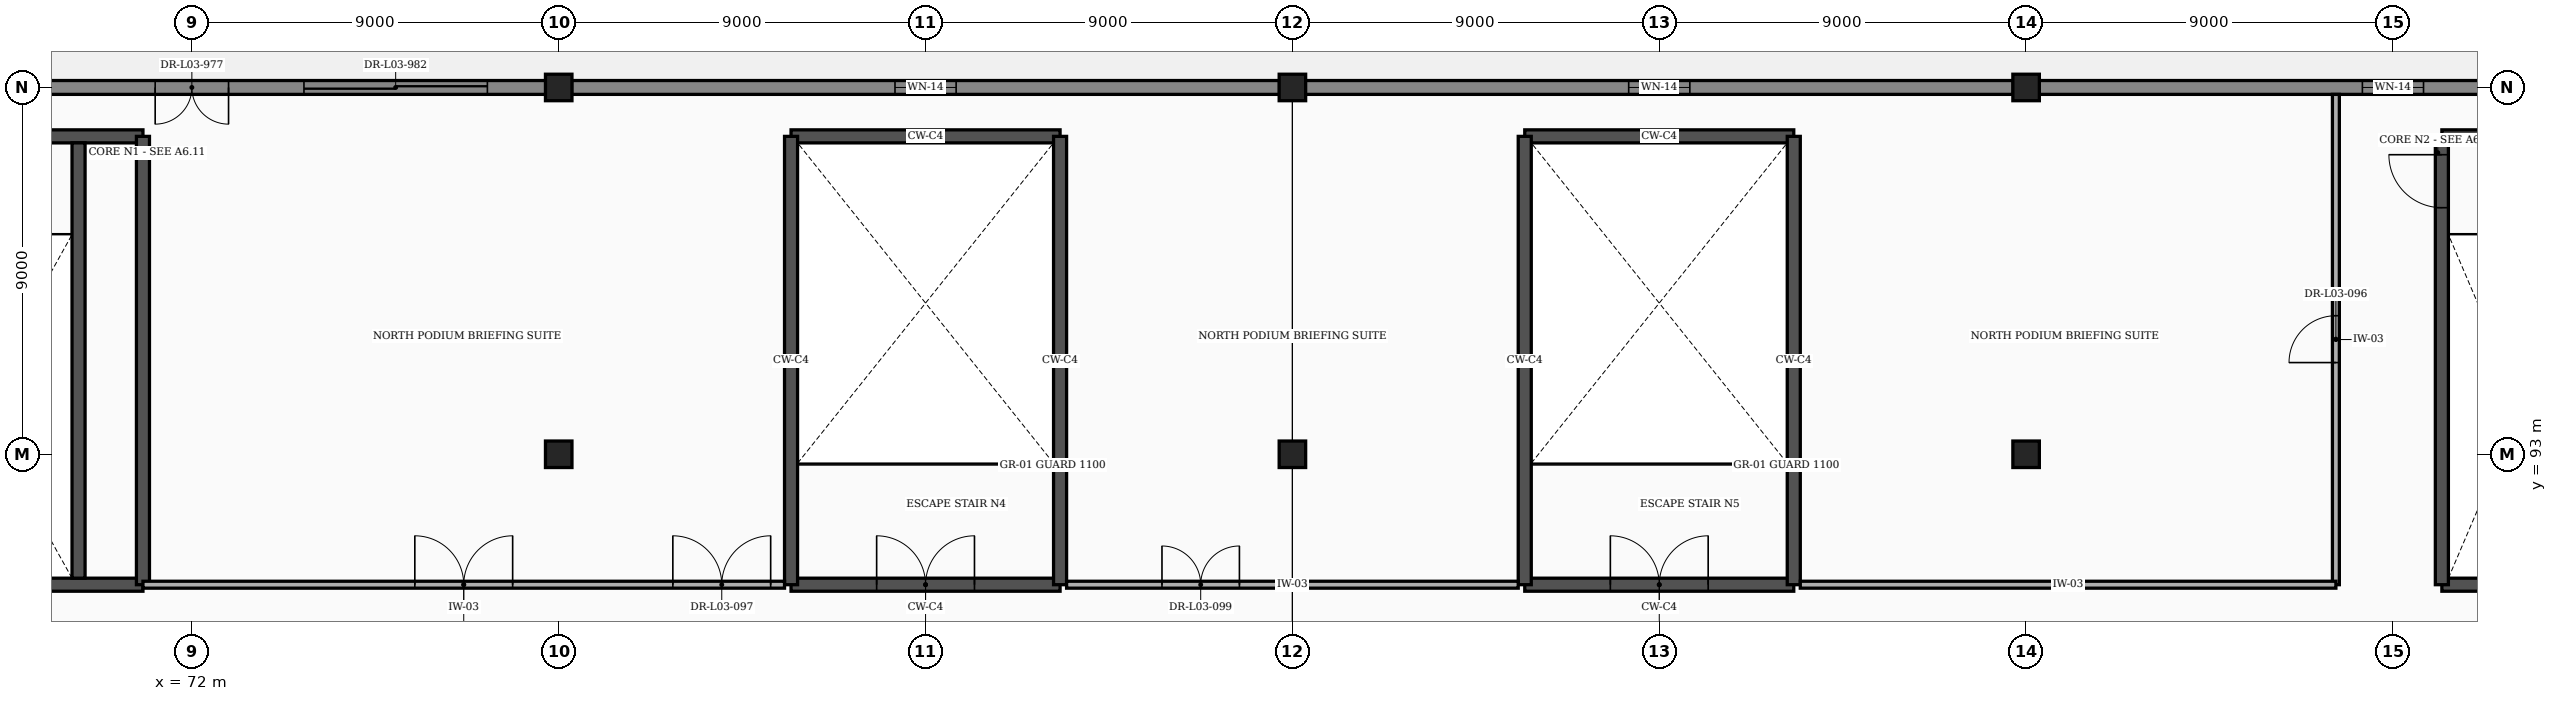
"""IFC4 building model, lengths in metres.
Left out: names, types, materials, properties, quantities, classifications, styles, units other than length and angle.
Written with IfcOpenShell. Run it as: python <this file> out.ifc"""

import sys

from ifc_helpers import new_model, si_unit, direction, frame, frame_2d, origin, origin_2d, place, context, subcontext, project, spatial, rectangle, extrude, element, fill, save


model = new_model("IFC4")
c1 = context("Model", 3, precision=1e-05, world=origin(), true_north=direction((0.0, 1.0)))
c2 = subcontext(c1, "Body", "Model", "MODEL_VIEW")
j1 = project(units=[si_unit("LENGTHUNIT", "METRE"), si_unit("PLANEANGLEUNIT", "RADIAN")], contexts=[c1])
p1 = place(None, origin())
s1 = spatial("IfcSite", under=j1, at=p1, CompositionType="ELEMENT")
p2 = place(p1, origin())
s2 = spatial("IfcBuilding", under=s1, at=p2, CompositionType="ELEMENT")
p3 = place(p2, frame((0.0, 0.0, 16.8)))
s3 = spatial("IfcBuildingStorey", under=s2, at=p3, CompositionType="ELEMENT", Elevation=16.8)
for number, where, z_axis, x_axis in (
    (1, (81.0, 93.0, 0.0), (0.0, 0.0, 1.0), (1.0, 0.0, 0.0)),
    (2, (81.0, 102.0, 0.0), (0.0, 0.0, 1.0), (1.0, 0.0, 0.0)),
    (3, (99.0, 93.0, 0.0), (0.0, 0.0, 1.0), (1.0, 0.0, 0.0)),
    (4, (99.0, 102.0, 0.0), (0.0, 0.0, 1.0), (1.0, 0.0, 0.0)),
    (5, (117.0, 93.0, 0.0), (0.0, 0.0, 1.0), (1.0, 0.0, 0.0)),
    (6, (117.0, 102.0, 0.0), (0.0, 0.0, 1.0), (1.0, 0.0, 0.0)),
):
    element("IfcColumn", number, at=place(p3, frame(where, z_axis=z_axis, x_axis=x_axis)), inside=s3, PredefinedType="COLUMN", context=c2, shape_type="SweptSolid", body=[
        extrude(rectangle(XDim=0.65, YDim=0.65, at=origin_2d()), origin(), (0.0, 0.0, 1.0), 4.8),
    ])
p4 = place(p3, frame((63.317, 102.0, 0.0), z_axis=(0.0, 0.0, 1.0), x_axis=(1.0, 0.0, 0.0)))
e7 = element("IfcWall", 7, at=p4, inside=s3, PredefinedType="STANDARD", context=c2, shape_type="SweptSolid", body=[
    extrude(rectangle(XDim=17.366, YDim=0.34, at=frame_2d((8.683, 0.0))), origin(), (0.0, 0.0, 1.0), 4.195),
])
p5 = place(p4, frame((7.783, 0.0, 0.0)))
e8 = element("IfcOpeningElement", 8, at=p5, cuts=e7, PredefinedType="OPENING", context=c2, shape_type="SweptSolid", body=[
    extrude(rectangle(XDim=1.8, YDim=2.3, at=frame_2d((0.9, 1.15))), frame((0.0, 0.182, 0.0), z_axis=(0.0, -1.0, 0.0), x_axis=(1.0, 0.0, 0.0)), (0.0, 0.0, 1.0), 0.364),
])
p6 = place(p4, frame((11.433, 0.0, 0.0)))
e9 = element("IfcOpeningElement", 9, at=p6, cuts=e7, PredefinedType="OPENING", context=c2, shape_type="SweptSolid", body=[
    extrude(rectangle(XDim=4.5, YDim=2.5, at=frame_2d((2.25, 1.25))), frame((0.0, 0.182, 0.0), z_axis=(0.0, -1.0, 0.0), x_axis=(1.0, 0.0, 0.0)), (0.0, 0.0, 1.0), 0.364),
])
p7 = place(p3, frame((81.317, 102.0, 0.0), z_axis=(0.0, 0.0, 1.0), x_axis=(1.0, 0.0, 0.0)))
e10 = element("IfcWall", 10, at=p7, inside=s3, PredefinedType="STANDARD", context=c2, shape_type="SweptSolid", body=[
    extrude(rectangle(XDim=17.366, YDim=0.34, at=frame_2d((8.683, 0.0))), origin(), (0.0, 0.0, 1.0), 4.195),
])
p8 = place(p7, frame((7.933, 0.0, 0.85)))
e11 = element("IfcOpeningElement", 11, at=p8, cuts=e10, PredefinedType="OPENING", context=c2, shape_type="SweptSolid", body=[
    extrude(rectangle(XDim=1.5, YDim=1.8, at=frame_2d((0.75, 0.9))), frame((0.0, 0.182, 0.0), z_axis=(0.0, -1.0, 0.0), x_axis=(1.0, 0.0, 0.0)), (0.0, 0.0, 1.0), 0.364),
])
p9 = place(p3, frame((99.317, 102.0, 0.0), z_axis=(0.0, 0.0, 1.0), x_axis=(1.0, 0.0, 0.0)))
e12 = element("IfcWall", 12, at=p9, inside=s3, PredefinedType="STANDARD", context=c2, shape_type="SweptSolid", body=[
    extrude(rectangle(XDim=17.366, YDim=0.34, at=frame_2d((8.683, 0.0))), origin(), (0.0, 0.0, 1.0), 4.195),
])
p10 = place(p9, frame((7.933, 0.0, 0.85)))
e13 = element("IfcOpeningElement", 13, at=p10, cuts=e12, PredefinedType="OPENING", context=c2, shape_type="SweptSolid", body=[
    extrude(rectangle(XDim=1.5, YDim=1.8, at=frame_2d((0.75, 0.9))), frame((0.0, 0.182, 0.0), z_axis=(0.0, -1.0, 0.0), x_axis=(1.0, 0.0, 0.0)), (0.0, 0.0, 1.0), 0.364),
])
p11 = place(p3, frame((117.317, 102.0, 0.0), z_axis=(0.0, 0.0, 1.0), x_axis=(1.0, 0.0, 0.0)))
e14 = element("IfcWall", 14, at=p11, inside=s3, PredefinedType="STANDARD", context=c2, shape_type="SweptSolid", body=[
    extrude(rectangle(XDim=17.366, YDim=0.34, at=frame_2d((8.683, 0.0))), origin(), (0.0, 0.0, 1.0), 4.195),
])
p12 = place(p11, frame((7.933, 0.0, 0.85)))
e15 = element("IfcOpeningElement", 15, at=p12, cuts=e14, PredefinedType="OPENING", context=c2, shape_type="SweptSolid", body=[
    extrude(rectangle(XDim=1.5, YDim=1.8, at=frame_2d((0.75, 0.9))), frame((0.0, 0.182, 0.0), z_axis=(0.0, -1.0, 0.0), x_axis=(1.0, 0.0, 0.0)), (0.0, 0.0, 1.0), 0.364),
])
for number, where, z_axis, x_axis in (
    (16, (64.2, 89.8, 0.0), (0.0, 0.0, 1.0), (1.0, 0.0, 0.0)),
    (17, (64.2, 100.8, 0.0), (0.0, 0.0, 1.0), (1.0, 0.0, 0.0)),
):
    element("IfcWall", number, at=place(p3, frame(where, z_axis=z_axis, x_axis=x_axis)), inside=s3, PredefinedType="SHEAR", context=c2, shape_type="SweptSolid", body=[
        extrude(rectangle(XDim=6.6, YDim=0.32, at=frame_2d((3.3, 0.0))), origin(), (0.0, 0.0, 1.0), 4.555),
    ])
p13 = place(p3, frame((70.8, 89.8, 0.0), z_axis=(0.0, 0.0, 1.0), x_axis=(0.0, 1.0, 0.0)))
e18 = element("IfcWall", 18, at=p13, inside=s3, PredefinedType="SHEAR", context=c2, shape_type="SweptSolid", body=[
    extrude(rectangle(XDim=11.0, YDim=0.32, at=frame_2d((5.5, 0.0))), origin(), (0.0, 0.0, 1.0), 4.555),
])
p14 = place(p3, frame((69.22, 89.96, 0.0), z_axis=(0.0, 0.0, 1.0), x_axis=(0.0, 1.0, 0.0)))
e19 = element("IfcWall", 19, at=p14, inside=s3, PredefinedType="SHEAR", context=c2, shape_type="SweptSolid", body=[
    extrude(rectangle(XDim=10.68, YDim=0.32, at=frame_2d((5.34, 0.0))), origin(), (0.0, 0.0, 1.0), 4.555),
])
p15 = place(p3, frame((127.2, 89.8, 0.0), z_axis=(0.0, 0.0, 1.0), x_axis=(1.0, 0.0, 0.0)))
e20 = element("IfcWall", 20, at=p15, inside=s3, PredefinedType="SHEAR", context=c2, shape_type="SweptSolid", body=[
    extrude(rectangle(XDim=6.6, YDim=0.32, at=frame_2d((3.3, 0.0))), origin(), (0.0, 0.0, 1.0), 4.555),
])
p16 = place(p15, frame((4.45, 0.0, 0.0)))
e21 = element("IfcOpeningElement", 21, at=p16, cuts=e20, PredefinedType="OPENING", context=c2, shape_type="SweptSolid", body=[
    extrude(rectangle(XDim=1.6, YDim=2.3, at=frame_2d((0.8, 1.15))), frame((0.0, 0.172, 0.0), z_axis=(0.0, -1.0, 0.0), x_axis=(1.0, 0.0, 0.0)), (0.0, 0.0, 1.0), 0.344),
])
p17 = place(p3, frame((127.2, 100.8, 0.0), z_axis=(0.0, 0.0, 1.0), x_axis=(1.0, 0.0, 0.0)))
e22 = element("IfcWall", 22, at=p17, inside=s3, PredefinedType="SHEAR", context=c2, shape_type="SweptSolid", body=[
    extrude(rectangle(XDim=6.6, YDim=0.32, at=frame_2d((3.3, 0.0))), origin(), (0.0, 0.0, 1.0), 4.555),
])
p18 = place(p3, frame((127.2, 89.8, 0.0), z_axis=(0.0, 0.0, 1.0), x_axis=(0.0, 1.0, 0.0)))
e23 = element("IfcWall", 23, at=p18, inside=s3, PredefinedType="SHEAR", context=c2, shape_type="SweptSolid", body=[
    extrude(rectangle(XDim=11.0, YDim=0.32, at=frame_2d((5.5, 0.0))), origin(), (0.0, 0.0, 1.0), 4.555),
])
p19 = place(p18, frame((9.25, 0.0, 0.0)))
e24 = element("IfcOpeningElement", 24, at=p19, cuts=e23, PredefinedType="OPENING", context=c2, shape_type="SweptSolid", body=[
    extrude(rectangle(XDim=1.3, YDim=2.2, at=frame_2d((0.65, 1.1))), frame((0.0, 0.172, 0.0), z_axis=(0.0, -1.0, 0.0), x_axis=(1.0, 0.0, 0.0)), (0.0, 0.0, 1.0), 0.344),
])
p20 = place(p3, frame((86.7, 89.8, 0.0), z_axis=(0.0, 0.0, 1.0), x_axis=(1.0, 0.0, 0.0)))
e25 = element("IfcWall", 25, at=p20, inside=s3, PredefinedType="SHEAR", context=c2, shape_type="SweptSolid", body=[
    extrude(rectangle(XDim=6.6, YDim=0.32, at=frame_2d((3.3, 0.0))), origin(), (0.0, 0.0, 1.0), 4.555),
])
p21 = place(p20, frame((2.1, 0.0, 0.0)))
e26 = element("IfcOpeningElement", 26, at=p21, cuts=e25, PredefinedType="OPENING", context=c2, shape_type="SweptSolid", body=[
    extrude(rectangle(XDim=2.4, YDim=2.25, at=frame_2d((1.2, 1.125))), frame((0.0, 0.172, 0.0), z_axis=(0.0, -1.0, 0.0), x_axis=(1.0, 0.0, 0.0)), (0.0, 0.0, 1.0), 0.344),
])
p22 = place(p3, frame((86.7, 100.8, 0.0), z_axis=(0.0, 0.0, 1.0), x_axis=(1.0, 0.0, 0.0)))
e27 = element("IfcWall", 27, at=p22, inside=s3, PredefinedType="SHEAR", context=c2, shape_type="SweptSolid", body=[
    extrude(rectangle(XDim=6.6, YDim=0.32, at=frame_2d((3.3, 0.0))), origin(), (0.0, 0.0, 1.0), 4.555),
])
for number, where, z_axis, x_axis in (
    (28, (86.7, 89.8, 0.0), (0.0, 0.0, 1.0), (0.0, 1.0, 0.0)),
    (29, (93.3, 89.8, 0.0), (0.0, 0.0, 1.0), (0.0, 1.0, 0.0)),
):
    element("IfcWall", number, at=place(p3, frame(where, z_axis=z_axis, x_axis=x_axis)), inside=s3, PredefinedType="SHEAR", context=c2, shape_type="SweptSolid", body=[
        extrude(rectangle(XDim=11.0, YDim=0.32, at=frame_2d((5.5, 0.0))), origin(), (0.0, 0.0, 1.0), 4.555),
    ])
p23 = place(p3, frame((104.7, 89.8, 0.0), z_axis=(0.0, 0.0, 1.0), x_axis=(1.0, 0.0, 0.0)))
e30 = element("IfcWall", 30, at=p23, inside=s3, PredefinedType="SHEAR", context=c2, shape_type="SweptSolid", body=[
    extrude(rectangle(XDim=6.6, YDim=0.32, at=frame_2d((3.3, 0.0))), origin(), (0.0, 0.0, 1.0), 4.555),
])
p24 = place(p23, frame((2.1, 0.0, 0.0)))
e31 = element("IfcOpeningElement", 31, at=p24, cuts=e30, PredefinedType="OPENING", context=c2, shape_type="SweptSolid", body=[
    extrude(rectangle(XDim=2.4, YDim=2.25, at=frame_2d((1.2, 1.125))), frame((0.0, 0.172, 0.0), z_axis=(0.0, -1.0, 0.0), x_axis=(1.0, 0.0, 0.0)), (0.0, 0.0, 1.0), 0.344),
])
p25 = place(p3, frame((104.7, 100.8, 0.0), z_axis=(0.0, 0.0, 1.0), x_axis=(1.0, 0.0, 0.0)))
e32 = element("IfcWall", 32, at=p25, inside=s3, PredefinedType="SHEAR", context=c2, shape_type="SweptSolid", body=[
    extrude(rectangle(XDim=6.6, YDim=0.32, at=frame_2d((3.3, 0.0))), origin(), (0.0, 0.0, 1.0), 4.555),
])
for number, where, z_axis, x_axis in (
    (33, (104.7, 89.8, 0.0), (0.0, 0.0, 1.0), (0.0, 1.0, 0.0)),
    (34, (111.3, 89.8, 0.0), (0.0, 0.0, 1.0), (0.0, 1.0, 0.0)),
):
    element("IfcWall", number, at=place(p3, frame(where, z_axis=z_axis, x_axis=x_axis)), inside=s3, PredefinedType="SHEAR", context=c2, shape_type="SweptSolid", body=[
        extrude(rectangle(XDim=11.0, YDim=0.32, at=frame_2d((5.5, 0.0))), origin(), (0.0, 0.0, 1.0), 4.555),
    ])
p26 = place(p3, frame((124.6, 89.8, 0.0), z_axis=(0.0, 0.0, 1.0), x_axis=(0.0, 1.0, 0.0)))
e35 = element("IfcWall", 35, at=p26, inside=s3, PredefinedType="PARTITIONING", context=c2, shape_type="SweptSolid", body=[
    extrude(rectangle(XDim=12.03, YDim=0.17, at=frame_2d((6.015, 0.0))), origin(), (0.0, 0.0, 1.0), 4.555),
])
p27 = place(p26, frame((5.45, 0.0, 0.0)))
e36 = element("IfcOpeningElement", 36, at=p27, cuts=e35, PredefinedType="OPENING", context=c2, shape_type="SweptSolid", body=[
    extrude(rectangle(XDim=1.15, YDim=2.15, at=frame_2d((0.575, 1.075))), frame((0.0, 0.097, 0.0), z_axis=(0.0, -1.0, 0.0), x_axis=(1.0, 0.0, 0.0)), (0.0, 0.0, 1.0), 0.194),
])
p28 = place(p3, frame((70.8, 89.8, 0.0), z_axis=(0.0, 0.0, 1.0), x_axis=(1.0, 0.0, 0.0)))
e37 = element("IfcWall", 37, at=p28, inside=s3, PredefinedType="PARTITIONING", context=c2, shape_type="SweptSolid", body=[
    extrude(rectangle(XDim=15.74, YDim=0.17, at=frame_2d((7.87, 0.0))), origin(), (0.0, 0.0, 1.0), 4.555),
])
p29 = place(p28, frame((13.0, 0.0, 0.0)))
e38 = element("IfcOpeningElement", 38, at=p29, cuts=e37, PredefinedType="OPENING", context=c2, shape_type="SweptSolid", body=[
    extrude(rectangle(XDim=2.4, YDim=2.35, at=frame_2d((1.2, 1.175))), frame((0.0, 0.097, 0.0), z_axis=(0.0, -1.0, 0.0), x_axis=(1.0, 0.0, 0.0)), (0.0, 0.0, 1.0), 0.194),
])
p30 = place(p28, frame((6.67, 0.0, 0.0)))
e39 = element("IfcOpeningElement", 39, at=p30, cuts=e37, PredefinedType="OPENING", context=c2, shape_type="SweptSolid", body=[
    extrude(rectangle(XDim=2.4, YDim=2.35, at=frame_2d((1.2, 1.175))), frame((0.0, 0.097, 0.0), z_axis=(0.0, -1.0, 0.0), x_axis=(1.0, 0.0, 0.0)), (0.0, 0.0, 1.0), 0.194),
])
p31 = place(p3, frame((93.46, 89.8, 0.0), z_axis=(0.0, 0.0, 1.0), x_axis=(1.0, 0.0, 0.0)))
e40 = element("IfcWall", 40, at=p31, inside=s3, PredefinedType="PARTITIONING", context=c2, shape_type="SweptSolid", body=[
    extrude(rectangle(XDim=11.08, YDim=0.17, at=frame_2d((5.54, 0.0))), origin(), (0.0, 0.0, 1.0), 4.555),
])
p32 = place(p31, frame((2.34, 0.0, 0.0)))
e41 = element("IfcOpeningElement", 41, at=p32, cuts=e40, PredefinedType="OPENING", context=c2, shape_type="SweptSolid", body=[
    extrude(rectangle(XDim=1.9, YDim=2.35, at=frame_2d((0.95, 1.175))), frame((0.0, 0.097, 0.0), z_axis=(0.0, -1.0, 0.0), x_axis=(1.0, 0.0, 0.0)), (0.0, 0.0, 1.0), 0.194),
])
p33 = place(p3, frame((111.46, 89.8, 0.0), z_axis=(0.0, 0.0, 1.0), x_axis=(1.0, 0.0, 0.0)))
e42 = element("IfcWall", 42, at=p33, inside=s3, PredefinedType="PARTITIONING", context=c2, shape_type="SweptSolid", body=[
    extrude(rectangle(XDim=13.14, YDim=0.17, at=frame_2d((6.57, 0.0))), origin(), (0.0, 0.0, 1.0), 4.555),
])
p34 = place(p5, frame((1.8, 0.0, 0.0), z_axis=(0.0, 0.0, 1.0), x_axis=(-1.0, 0.0, 0.0)))
e43 = element("IfcDoor", 43, at=p34, inside=s3, OperationType="DOUBLE_DOOR_SINGLE_SWING", PredefinedType="DOOR", context=c2, shape_type="SweptSolid", body=[
    extrude(rectangle(XDim=1.8, YDim=2.3, at=frame_2d((0.9, 1.15))), frame((0.0, 0.025, 0.0), z_axis=(0.0, -1.0, 0.0), x_axis=(1.0, 0.0, 0.0)), (0.0, 0.0, 1.0), 0.05),
])
fill(e8, e43)
p35 = place(p8, origin())
e44 = element("IfcWindow", 44, at=p35, inside=s3, PartitioningType="SINGLE_PANEL", PredefinedType="WINDOW", context=c2, shape_type="SweptSolid", body=[
    extrude(rectangle(XDim=1.5, YDim=1.8, at=frame_2d((0.75, 0.9))), frame((0.0, 0.03, 0.0), z_axis=(0.0, -1.0, 0.0), x_axis=(1.0, 0.0, 0.0)), (0.0, 0.0, 1.0), 0.06),
])
fill(e11, e44)
p36 = place(p10, origin())
e45 = element("IfcWindow", 45, at=p36, inside=s3, PartitioningType="SINGLE_PANEL", PredefinedType="WINDOW", context=c2, shape_type="SweptSolid", body=[
    extrude(rectangle(XDim=1.5, YDim=1.8, at=frame_2d((0.75, 0.9))), frame((0.0, 0.03, 0.0), z_axis=(0.0, -1.0, 0.0), x_axis=(1.0, 0.0, 0.0)), (0.0, 0.0, 1.0), 0.06),
])
fill(e13, e45)
p37 = place(p12, origin())
e46 = element("IfcWindow", 46, at=p37, inside=s3, PartitioningType="SINGLE_PANEL", PredefinedType="WINDOW", context=c2, shape_type="SweptSolid", body=[
    extrude(rectangle(XDim=1.5, YDim=1.8, at=frame_2d((0.75, 0.9))), frame((0.0, 0.03, 0.0), z_axis=(0.0, -1.0, 0.0), x_axis=(1.0, 0.0, 0.0)), (0.0, 0.0, 1.0), 0.06),
])
fill(e15, e46)
p38 = place(p6, origin())
e47 = element("IfcDoor", 47, at=p38, inside=s3, OperationType="DOUBLE_DOOR_SLIDING", PredefinedType="DOOR", context=c2, shape_type="SweptSolid", body=[
    extrude(rectangle(XDim=4.5, YDim=2.5, at=frame_2d((2.25, 1.25))), frame((0.0, 0.025, 0.0), z_axis=(0.0, -1.0, 0.0), x_axis=(1.0, 0.0, 0.0)), (0.0, 0.0, 1.0), 0.05),
])
fill(e9, e47)
p39 = place(p19, origin())
e48 = element("IfcDoor", 48, at=p39, inside=s3, OperationType="SINGLE_SWING_RIGHT", PredefinedType="DOOR", context=c2, shape_type="SweptSolid", body=[
    extrude(rectangle(XDim=1.3, YDim=2.2, at=frame_2d((0.65, 1.1))), frame((0.0, 0.025, 0.0), z_axis=(0.0, -1.0, 0.0), x_axis=(1.0, 0.0, 0.0)), (0.0, 0.0, 1.0), 0.05),
])
fill(e24, e48)
p40 = place(p21, origin())
e49 = element("IfcDoor", 49, at=p40, inside=s3, OperationType="DOUBLE_DOOR_SINGLE_SWING", PredefinedType="DOOR", context=c2, shape_type="SweptSolid", body=[
    extrude(rectangle(XDim=2.4, YDim=2.25, at=frame_2d((1.2, 1.125))), frame((0.0, 0.025, 0.0), z_axis=(0.0, -1.0, 0.0), x_axis=(1.0, 0.0, 0.0)), (0.0, 0.0, 1.0), 0.05),
])
fill(e26, e49)
p41 = place(p24, origin())
e50 = element("IfcDoor", 50, at=p41, inside=s3, OperationType="DOUBLE_DOOR_SINGLE_SWING", PredefinedType="DOOR", context=c2, shape_type="SweptSolid", body=[
    extrude(rectangle(XDim=2.4, YDim=2.25, at=frame_2d((1.2, 1.125))), frame((0.0, 0.025, 0.0), z_axis=(0.0, -1.0, 0.0), x_axis=(1.0, 0.0, 0.0)), (0.0, 0.0, 1.0), 0.05),
])
fill(e31, e50)
p42 = place(p27, origin())
e51 = element("IfcDoor", 51, at=p42, inside=s3, OperationType="SINGLE_SWING_LEFT", PredefinedType="DOOR", context=c2, shape_type="SweptSolid", body=[
    extrude(rectangle(XDim=1.15, YDim=2.15, at=frame_2d((0.575, 1.075))), frame((0.0, 0.025, 0.0), z_axis=(0.0, -1.0, 0.0), x_axis=(1.0, 0.0, 0.0)), (0.0, 0.0, 1.0), 0.05),
])
fill(e36, e51)
p43 = place(p29, origin())
e52 = element("IfcDoor", 52, at=p43, inside=s3, OperationType="DOUBLE_DOOR_SINGLE_SWING", PredefinedType="DOOR", context=c2, shape_type="SweptSolid", body=[
    extrude(rectangle(XDim=2.4, YDim=2.35, at=frame_2d((1.2, 1.175))), frame((0.0, 0.025, 0.0), z_axis=(0.0, -1.0, 0.0), x_axis=(1.0, 0.0, 0.0)), (0.0, 0.0, 1.0), 0.05),
])
fill(e38, e52)
p44 = place(p30, origin())
e53 = element("IfcDoor", 53, at=p44, inside=s3, OperationType="DOUBLE_DOOR_SINGLE_SWING", PredefinedType="DOOR", context=c2, shape_type="SweptSolid", body=[
    extrude(rectangle(XDim=2.4, YDim=2.35, at=frame_2d((1.2, 1.175))), frame((0.0, 0.025, 0.0), z_axis=(0.0, -1.0, 0.0), x_axis=(1.0, 0.0, 0.0)), (0.0, 0.0, 1.0), 0.05),
])
fill(e39, e53)
p45 = place(p32, origin())
e54 = element("IfcDoor", 54, at=p45, inside=s3, OperationType="DOUBLE_DOOR_SINGLE_SWING", PredefinedType="DOOR", context=c2, shape_type="SweptSolid", body=[
    extrude(rectangle(XDim=1.9, YDim=2.35, at=frame_2d((0.95, 1.175))), frame((0.0, 0.025, 0.0), z_axis=(0.0, -1.0, 0.0), x_axis=(1.0, 0.0, 0.0)), (0.0, 0.0, 1.0), 0.05),
])
fill(e41, e54)
save(model, sys.argv[1])
